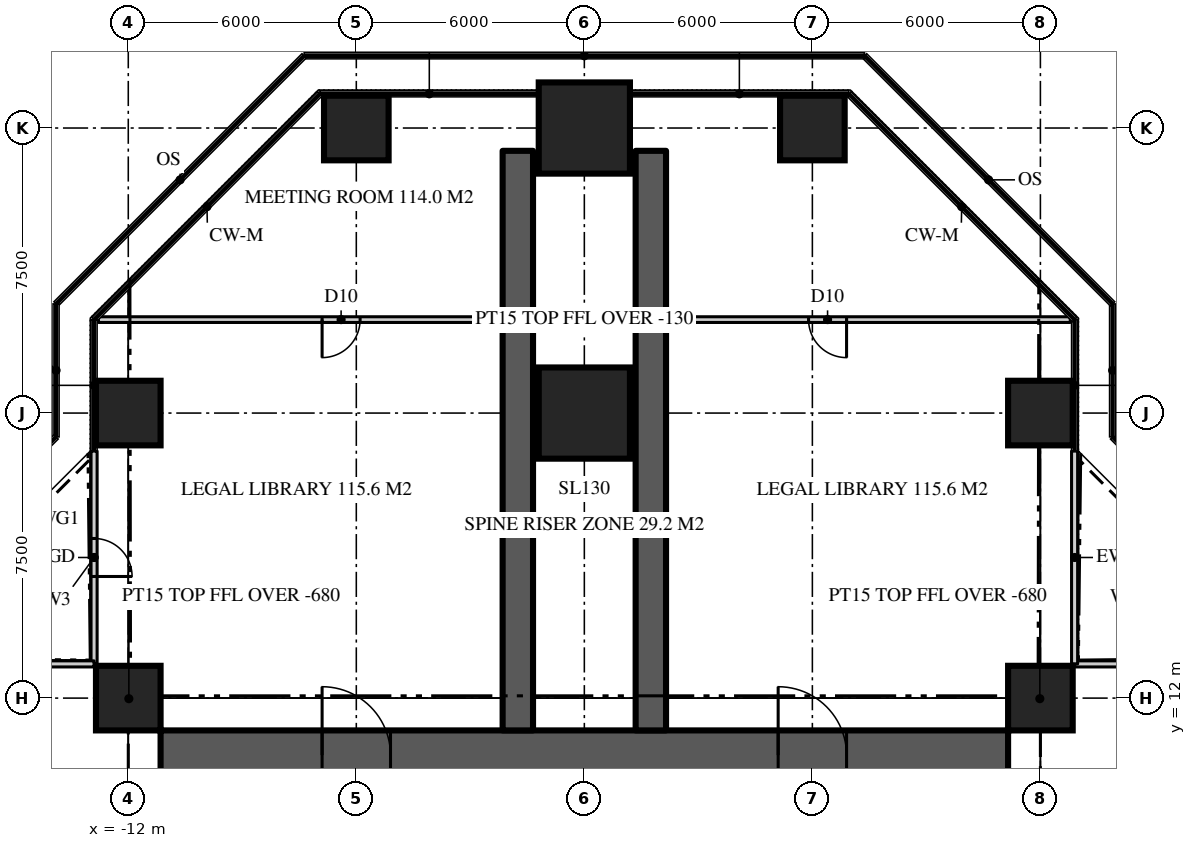
"""IFC4 building model, lengths in metres.
Left out: names, types, materials, properties, quantities, classifications, styles, units other than length and angle.
Written with IfcOpenShell. Run it as: python <this file> out.ifc"""

import sys

from ifc_helpers import new_model, si_unit, direction, frame, frame_2d, origin, origin_2d, place, context, subcontext, project, spatial, rectangle, extrude, element, fill, save


model = new_model("IFC4")
c1 = context("Model", 3, precision=1e-05, world=origin(), true_north=direction((0.0, 1.0)))
c2 = subcontext(c1, "Body", "Model", "MODEL_VIEW")
j1 = project(units=[si_unit("LENGTHUNIT", "METRE"), si_unit("PLANEANGLEUNIT", "RADIAN")], contexts=[c1])
p1 = place(None, origin())
s1 = spatial("IfcSite", under=j1, at=p1, CompositionType="ELEMENT")
p2 = place(p1, origin())
s2 = spatial("IfcBuilding", under=s1, at=p2, CompositionType="ELEMENT")
p3 = place(p2, frame((0.0, 0.0, 139.8)))
s3 = spatial("IfcBuildingStorey", under=s2, at=p3, CompositionType="ELEMENT", Elevation=139.8)
p4 = place(p3, frame((-11.15, 10.5, 0.0), z_axis=(0.0, 0.0, 1.0), x_axis=(1.0, 0.0, 0.0)))
e1 = element("IfcWall", 1, at=p4, inside=s3, PredefinedType="SHEAR", context=c2, shape_type="SweptSolid", body=[
    extrude(rectangle(XDim=22.3, YDim=1.3, at=frame_2d((11.15, 0.0))), origin(), (0.0, 0.0, 1.0), 3.9),
])
p5 = place(p4, frame((4.25, 0.0, 0.0)))
e2 = element("IfcOpeningElement", 2, at=p5, cuts=e1, PredefinedType="OPENING", context=c2, shape_type="SweptSolid", body=[
    extrude(rectangle(XDim=1.8, YDim=2.2, at=frame_2d((0.9, 1.1))), frame((0.0, 0.66, 0.0), z_axis=(0.0, -1.0, 0.0), x_axis=(1.0, 0.0, 0.0)), (0.0, 0.0, 1.0), 1.32),
])
p6 = place(p4, frame((16.25, 0.0, 0.0)))
e3 = element("IfcOpeningElement", 3, at=p6, cuts=e1, PredefinedType="OPENING", context=c2, shape_type="SweptSolid", body=[
    extrude(rectangle(XDim=1.8, YDim=2.2, at=frame_2d((0.9, 1.1))), frame((0.0, 0.66, 0.0), z_axis=(0.0, -1.0, 0.0), x_axis=(1.0, 0.0, 0.0)), (0.0, 0.0, 1.0), 1.32),
])
for number, where, z_axis, x_axis in (
    (4, (1.75, 11.15, 0.0), (0.0, 0.0, 1.0), (0.0, 1.0, 0.0)),
    (5, (-1.75, 11.15, 0.0), (0.0, 0.0, 1.0), (0.0, 1.0, 0.0)),
):
    element("IfcWall", number, at=place(p3, frame(where, z_axis=z_axis, x_axis=x_axis)), inside=s3, PredefinedType="SHEAR", context=c2, shape_type="SweptSolid", body=[
        extrude(rectangle(XDim=15.25, YDim=0.8, at=frame_2d((7.625, 0.0))), origin(), (0.0, 0.0, 1.0), 3.9),
    ])
for number, where, z_axis, x_axis in (
    (6, (-12.0, 12.0, 0.0), (0.0, 0.0, 1.0), (1.0, 0.0, 0.0)),
    (7, (12.0, 12.0, 0.0), (0.0, 0.0, 1.0), (1.0, 0.0, 0.0)),
    (8, (-12.0, 19.5, 0.0), (0.0, 0.0, 1.0), (1.0, 0.0, 0.0)),
):
    element("IfcColumn", number, at=place(p3, frame(where, z_axis=z_axis, x_axis=x_axis)), inside=s3, PredefinedType="COLUMN", context=c2, shape_type="SweptSolid", body=[
        extrude(rectangle(XDim=1.7, YDim=1.7, at=origin_2d()), origin(), (0.0, 0.0, 1.0), 3.9),
    ])
p7 = place(p3, frame((0.0, 19.5, 0.0), z_axis=(0.0, 0.0, 1.0), x_axis=(1.0, 0.0, 0.0)))
e9 = element("IfcColumn", 9, at=p7, inside=s3, PredefinedType="COLUMN", context=c2, shape_type="SweptSolid", body=[
    extrude(rectangle(XDim=2.4, YDim=2.4, at=origin_2d()), origin(), (0.0, 0.0, 1.0), 3.9),
])
for number, where, z_axis, x_axis in (
    (10, (12.0, 19.5, 0.0), (0.0, 0.0, 1.0), (1.0, 0.0, 0.0)),
    (11, (-6.0, 27.0, 0.0), (0.0, 0.0, 1.0), (1.0, 0.0, 0.0)),
):
    element("IfcColumn", number, at=place(p3, frame(where, z_axis=z_axis, x_axis=x_axis)), inside=s3, PredefinedType="COLUMN", context=c2, shape_type="SweptSolid", body=[
        extrude(rectangle(XDim=1.7, YDim=1.7, at=origin_2d()), origin(), (0.0, 0.0, 1.0), 3.9),
    ])
p8 = place(p3, frame((0.0, 27.0, 0.0), z_axis=(0.0, 0.0, 1.0), x_axis=(1.0, 0.0, 0.0)))
e12 = element("IfcColumn", 12, at=p8, inside=s3, PredefinedType="COLUMN", context=c2, shape_type="SweptSolid", body=[
    extrude(rectangle(XDim=2.4, YDim=2.4, at=origin_2d()), origin(), (0.0, 0.0, 1.0), 3.9),
])
p9 = place(p3, frame((6.0, 27.0, 0.0), z_axis=(0.0, 0.0, 1.0), x_axis=(1.0, 0.0, 0.0)))
e13 = element("IfcColumn", 13, at=p9, inside=s3, PredefinedType="COLUMN", context=c2, shape_type="SweptSolid", body=[
    extrude(rectangle(XDim=1.7, YDim=1.7, at=origin_2d()), origin(), (0.0, 0.0, 1.0), 3.9),
])
p10 = place(p3, frame((18.5, 12.9, 0.0), z_axis=(0.0, 0.0, 1.0), x_axis=(-1.0, 0.0, 0.0)))
e14 = element("IfcWall", 14, at=p10, inside=s3, PredefinedType="SOLIDWALL", context=c2, shape_type="SweptSolid", body=[
    extrude(rectangle(XDim=5.6, YDim=0.16, at=frame_2d((2.8, 0.0))), origin(), (0.0, 0.0, 1.0), 3.77),
])
p11 = place(p10, frame((2.3, 0.0, 0.0)))
e15 = element("IfcOpeningElement", 15, at=p11, cuts=e14, PredefinedType="OPENING", context=c2, shape_type="SweptSolid", body=[
    extrude(rectangle(XDim=1.0, YDim=2.2, at=frame_2d((0.5, 1.1))), frame((0.0, 0.09, 0.0), z_axis=(0.0, -1.0, 0.0), x_axis=(1.0, 0.0, 0.0)), (0.0, 0.0, 1.0), 0.18),
])
p12 = place(p3, frame((12.9, 12.9, 0.0), z_axis=(0.0, 0.0, 1.0), x_axis=(0.0, 1.0, 0.0)))
e16 = element("IfcWall", 16, at=p12, inside=s3, PredefinedType="SOLIDWALL", context=c2, shape_type="SweptSolid", body=[
    extrude(rectangle(XDim=5.6, YDim=0.16, at=frame_2d((2.8, 0.0))), origin(), (0.0, 0.0, 1.0), 3.77),
])
p13 = place(p3, frame((-12.9, 18.5, 0.0), z_axis=(0.0, 0.0, 1.0), x_axis=(0.0, -1.0, 0.0)))
e17 = element("IfcWall", 17, at=p13, inside=s3, PredefinedType="SOLIDWALL", context=c2, shape_type="SweptSolid", body=[
    extrude(rectangle(XDim=5.6, YDim=0.16, at=frame_2d((2.8, 0.0))), origin(), (0.0, 0.0, 1.0), 3.77),
])
p14 = place(p13, frame((2.3, 0.0, 0.0)))
e18 = element("IfcOpeningElement", 18, at=p14, cuts=e17, PredefinedType="OPENING", context=c2, shape_type="SweptSolid", body=[
    extrude(rectangle(XDim=1.0, YDim=2.2, at=frame_2d((0.5, 1.1))), frame((0.0, 0.09, 0.0), z_axis=(0.0, -1.0, 0.0), x_axis=(1.0, 0.0, 0.0)), (0.0, 0.0, 1.0), 0.18),
])
p15 = place(p3, frame((-12.9, 12.9, 0.0), z_axis=(0.0, 0.0, 1.0), x_axis=(-1.0, 0.0, 0.0)))
e19 = element("IfcWall", 19, at=p15, inside=s3, PredefinedType="SOLIDWALL", context=c2, shape_type="SweptSolid", body=[
    extrude(rectangle(XDim=5.6, YDim=0.16, at=frame_2d((2.8, 0.0))), origin(), (0.0, 0.0, 1.0), 3.77),
])
p16 = place(p3, frame((12.786, 21.959, 0.0), z_axis=(0.0, 0.0, 1.0), x_axis=(-1.0, 0.0, 0.0)))
e20 = element("IfcWall", 20, at=p16, inside=s3, PredefinedType="PARTITIONING", context=c2, shape_type="SweptSolid", body=[
    extrude(rectangle(XDim=25.573, YDim=0.15, at=frame_2d((12.786, 0.0))), origin(), (0.0, 0.0, 1.0), 3.77),
])
p17 = place(p16, frame((18.687, 0.0, 0.0)))
e21 = element("IfcOpeningElement", 21, at=p17, cuts=e20, PredefinedType="OPENING", context=c2, shape_type="SweptSolid", body=[
    extrude(rectangle(XDim=1.0, YDim=2.2, at=frame_2d((0.5, 1.1))), frame((0.0, 0.085, 0.0), z_axis=(0.0, -1.0, 0.0), x_axis=(1.0, 0.0, 0.0)), (0.0, 0.0, 1.0), 0.17),
])
p18 = place(p16, frame((5.886, 0.0, 0.0)))
e22 = element("IfcOpeningElement", 22, at=p18, cuts=e20, PredefinedType="OPENING", context=c2, shape_type="SweptSolid", body=[
    extrude(rectangle(XDim=1.0, YDim=2.2, at=frame_2d((0.5, 1.1))), frame((0.0, 0.085, 0.0), z_axis=(0.0, -1.0, 0.0), x_axis=(1.0, 0.0, 0.0)), (0.0, 0.0, 1.0), 0.17),
])
for number, where, z_axis, x_axis in (
    (23, (11.15, 11.15, 0.0), (0.0, 0.0, 1.0), (0.707, 0.707, 0.0)),
    (24, (-11.15, 11.15, 0.0), (0.0, 0.0, 1.0), (-0.707, 0.707, 0.0)),
):
    element("IfcWall", number, at=place(p3, frame(where, z_axis=z_axis, x_axis=x_axis)), inside=s3, PredefinedType="PARTITIONING", context=c2, shape_type="SweptSolid", body=[
        extrude(rectangle(XDim=2.362, YDim=0.15, at=frame_2d((1.181, 0.0))), origin(), (0.0, 0.0, 1.0), 3.22),
    ])
p19 = place(p14, origin())
e25 = element("IfcDoor", 25, at=p19, inside=s3, OperationType="SINGLE_SWING_RIGHT", PredefinedType="DOOR", context=c2, shape_type="SweptSolid", body=[
    extrude(rectangle(XDim=1.0, YDim=2.2, at=frame_2d((0.5, 1.1))), frame((0.0, 0.025, 0.0), z_axis=(0.0, -1.0, 0.0), x_axis=(1.0, 0.0, 0.0)), (0.0, 0.0, 1.0), 0.05),
])
fill(e18, e25)
p20 = place(p5, origin())
e26 = element("IfcDoor", 26, at=p20, inside=s3, OperationType="DOUBLE_DOOR_DOUBLE_SWING", PredefinedType="DOOR", context=c2, shape_type="SweptSolid", body=[
    extrude(rectangle(XDim=1.8, YDim=2.2, at=frame_2d((0.9, 1.1))), frame((0.0, 0.025, 0.0), z_axis=(0.0, -1.0, 0.0), x_axis=(1.0, 0.0, 0.0)), (0.0, 0.0, 1.0), 0.05),
])
fill(e2, e26)
p21 = place(p6, origin())
e27 = element("IfcDoor", 27, at=p21, inside=s3, OperationType="DOUBLE_DOOR_DOUBLE_SWING", PredefinedType="DOOR", context=c2, shape_type="SweptSolid", body=[
    extrude(rectangle(XDim=1.8, YDim=2.2, at=frame_2d((0.9, 1.1))), frame((0.0, 0.025, 0.0), z_axis=(0.0, -1.0, 0.0), x_axis=(1.0, 0.0, 0.0)), (0.0, 0.0, 1.0), 0.05),
])
fill(e3, e27)
p22 = place(p17, origin())
e28 = element("IfcDoor", 28, at=p22, inside=s3, OperationType="SINGLE_SWING_RIGHT", PredefinedType="DOOR", context=c2, shape_type="SweptSolid", body=[
    extrude(rectangle(XDim=1.0, YDim=2.2, at=frame_2d((0.5, 1.1))), frame((0.0, 0.025, 0.0), z_axis=(0.0, -1.0, 0.0), x_axis=(1.0, 0.0, 0.0)), (0.0, 0.0, 1.0), 0.05),
])
fill(e21, e28)
p23 = place(p18, origin())
e29 = element("IfcDoor", 29, at=p23, inside=s3, OperationType="SINGLE_SWING_LEFT", PredefinedType="DOOR", context=c2, shape_type="SweptSolid", body=[
    extrude(rectangle(XDim=1.0, YDim=2.2, at=frame_2d((0.5, 1.1))), frame((0.0, 0.025, 0.0), z_axis=(0.0, -1.0, 0.0), x_axis=(1.0, 0.0, 0.0)), (0.0, 0.0, 1.0), 0.05),
])
fill(e22, e29)
save(model, sys.argv[1])
